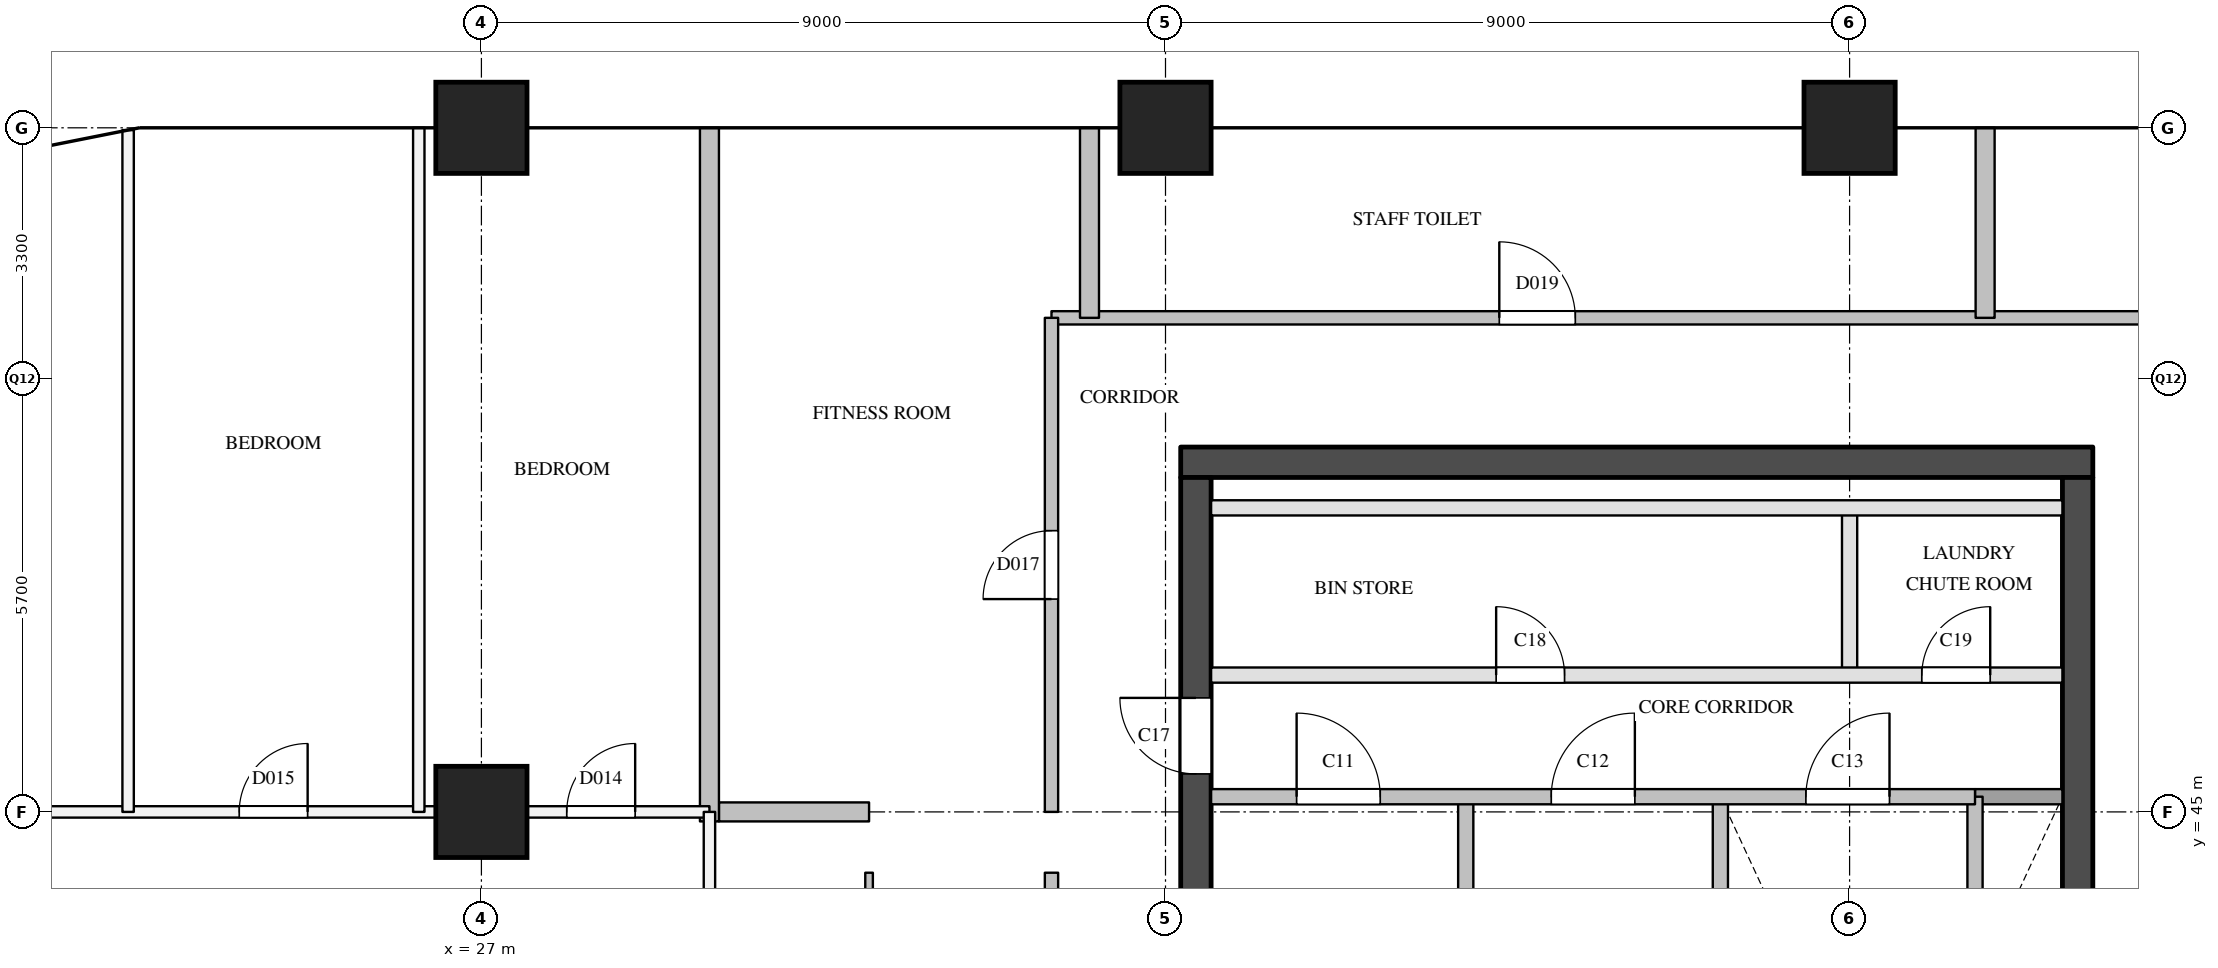
"""IFC4 building model, lengths in metres.
Left out: names, types, materials, properties, quantities, classifications, styles, units other than length and angle.
Written with IfcOpenShell. Run it as: python <this file> out.ifc"""

import sys

from ifc_helpers import new_model, si_unit, direction, frame, frame_2d, origin, origin_2d, place, context, subcontext, project, spatial, rectangle, extrude, element, fill, save


model = new_model("IFC4")
c1 = context("Model", 3, precision=1e-05, world=origin(), true_north=direction((0.0, 1.0)))
c2 = subcontext(c1, "Body", "Model", "MODEL_VIEW")
j1 = project(units=[si_unit("LENGTHUNIT", "METRE"), si_unit("PLANEANGLEUNIT", "RADIAN")], contexts=[c1])
p1 = place(None, origin())
s1 = spatial("IfcSite", under=j1, at=p1, CompositionType="ELEMENT")
p2 = place(p1, origin())
s2 = spatial("IfcBuilding", under=s1, at=p2, CompositionType="ELEMENT")
p3 = place(p2, frame((0.0, 0.0, 246.2)))
s3 = spatial("IfcBuildingStorey", under=s2, at=p3, CompositionType="ELEMENT", Elevation=246.2)
for number, where, z_axis, x_axis in (
    (1, (27.0, 45.0, 0.0), (0.0, 0.0, 1.0), (1.0, 0.0, 0.0)),
    (2, (27.0, 54.0, 0.0), (0.0, 0.0, 1.0), (1.0, 0.0, 0.0)),
    (3, (36.0, 54.0, 0.0), (0.0, 0.0, 1.0), (1.0, 0.0, 0.0)),
    (4, (45.0, 54.0, 0.0), (0.0, 0.0, 1.0), (1.0, 0.0, 0.0)),
):
    element("IfcColumn", number, at=place(p3, frame(where, z_axis=z_axis, x_axis=x_axis)), inside=s3, PredefinedType="COLUMN", context=c2, shape_type="SweptSolid", body=[
        extrude(rectangle(XDim=1.2, YDim=1.2, at=origin_2d()), origin(), (0.0, 0.0, 1.0), 3.9),
    ])
p4 = place(p3, frame((36.2, 49.6, 0.0), z_axis=(0.0, 0.0, 1.0), x_axis=(1.0, 0.0, 0.0)))
e5 = element("IfcWall", 5, at=p4, inside=s3, PredefinedType="SHEAR", context=c2, shape_type="SweptSolid", body=[
    extrude(rectangle(XDim=12.0, YDim=0.4, at=frame_2d((6.0, 0.0))), origin(), (0.0, 0.0, 1.0), 3.6),
])
p5 = place(p3, frame((36.4, 29.1, 0.0), z_axis=(0.0, 0.0, 1.0), x_axis=(0.0, 1.0, 0.0)))
e6 = element("IfcWall", 6, at=p5, inside=s3, PredefinedType="SHEAR", context=c2, shape_type="SweptSolid", body=[
    extrude(rectangle(XDim=20.3, YDim=0.4, at=frame_2d((10.15, 0.0))), origin(), (0.0, 0.0, 1.0), 3.6),
])
p6 = place(p5, frame((3.6, 0.0, 0.0)))
e7 = element("IfcOpeningElement", 7, at=p6, cuts=e6, PredefinedType="OPENING", context=c2, shape_type="SweptSolid", body=[
    extrude(rectangle(XDim=1.8, YDim=2.1, at=frame_2d((0.9, 1.05))), frame((0.0, 0.21, 0.0), z_axis=(0.0, -1.0, 0.0), x_axis=(1.0, 0.0, 0.0)), (0.0, 0.0, 1.0), 0.42),
])
p7 = place(p5, frame((16.4, 0.0, 0.0)))
e8 = element("IfcOpeningElement", 8, at=p7, cuts=e6, PredefinedType="OPENING", context=c2, shape_type="SweptSolid", body=[
    extrude(rectangle(XDim=1.0, YDim=2.1, at=frame_2d((0.5, 1.05))), frame((0.0, 0.21, 0.0), z_axis=(0.0, -1.0, 0.0), x_axis=(1.0, 0.0, 0.0)), (0.0, 0.0, 1.0), 0.42),
])
p8 = place(p3, frame((48.0, 29.1, 0.0), z_axis=(0.0, 0.0, 1.0), x_axis=(0.0, 1.0, 0.0)))
e9 = element("IfcWall", 9, at=p8, inside=s3, PredefinedType="SHEAR", context=c2, shape_type="SweptSolid", body=[
    extrude(rectangle(XDim=20.3, YDim=0.4, at=frame_2d((10.15, 0.0))), origin(), (0.0, 0.0, 1.0), 3.6),
])
p9 = place(p8, frame((12.5, 0.0, 0.0)))
e10 = element("IfcOpeningElement", 10, at=p9, cuts=e9, PredefinedType="OPENING", context=c2, shape_type="SweptSolid", body=[
    extrude(rectangle(XDim=0.7, YDim=2.1, at=frame_2d((0.35, 1.05))), frame((0.0, 0.21, 0.0), z_axis=(0.0, -1.0, 0.0), x_axis=(1.0, 0.0, 0.0)), (0.0, 0.0, 1.0), 0.42),
])
p10 = place(p8, frame((3.9, 0.0, 0.0)))
e11 = element("IfcOpeningElement", 11, at=p10, cuts=e9, PredefinedType="OPENING", context=c2, shape_type="SweptSolid", body=[
    extrude(rectangle(XDim=1.8, YDim=2.1, at=frame_2d((0.9, 1.05))), frame((0.0, 0.21, 0.0), z_axis=(0.0, -1.0, 0.0), x_axis=(1.0, 0.0, 0.0)), (0.0, 0.0, 1.0), 0.42),
])
for number, where, z_axis, x_axis in (
    (12, (39.95, 40.78, 0.0), (0.0, 0.0, 1.0), (0.0, 1.0, 0.0)),
    (13, (43.3, 40.78, 0.0), (0.0, 0.0, 1.0), (0.0, 1.0, 0.0)),
):
    element("IfcWall", number, at=place(p3, frame(where, z_axis=z_axis, x_axis=x_axis)), inside=s3, PredefinedType="SOLIDWALL", context=c2, shape_type="SweptSolid", body=[
        extrude(rectangle(XDim=4.42, YDim=0.2, at=frame_2d((2.21, 0.0))), origin(), (0.0, 0.0, 1.0), 3.6),
    ])
p11 = place(p3, frame((45.0, 46.8, 0.0), z_axis=(0.0, 0.0, 1.0), x_axis=(0.0, 1.0, 0.0)))
e14 = element("IfcWall", 14, at=p11, inside=s3, PredefinedType="PARTITIONING", context=c2, shape_type="SweptSolid", body=[
    extrude(rectangle(XDim=2.2, YDim=0.2, at=frame_2d((1.1, 0.0))), origin(), (0.0, 0.0, 1.0), 3.6),
])
p12 = place(p3, frame((46.65, 40.78, 0.0), z_axis=(0.0, 0.0, 1.0), x_axis=(0.0, 1.0, 0.0)))
e15 = element("IfcWall", 15, at=p12, inside=s3, PredefinedType="SOLIDWALL", context=c2, shape_type="SweptSolid", body=[
    extrude(rectangle(XDim=4.42, YDim=0.2, at=frame_2d((2.21, 0.0))), origin(), (0.0, 0.0, 1.0), 3.6),
])
p13 = place(p3, frame((46.65, 45.2, 0.0), z_axis=(0.0, 0.0, 1.0), x_axis=(1.0, 0.0, 0.0)))
e16 = element("IfcWall", 16, at=p13, inside=s3, PredefinedType="SOLIDWALL", context=c2, shape_type="SweptSolid", body=[
    extrude(rectangle(XDim=1.15, YDim=0.2, at=frame_2d((0.575, 0.0))), origin(), (0.0, 0.0, 1.0), 3.6),
])
p14 = place(p3, frame((36.6, 45.2, 0.0), z_axis=(0.0, 0.0, 1.0), x_axis=(1.0, 0.0, 0.0)))
e17 = element("IfcWall", 17, at=p14, inside=s3, PredefinedType="SOLIDWALL", context=c2, shape_type="SweptSolid", body=[
    extrude(rectangle(XDim=10.05, YDim=0.2, at=frame_2d((5.025, 0.0))), origin(), (0.0, 0.0, 1.0), 3.6),
])
p15 = place(p14, frame((1.125, 0.0, 0.0)))
e18 = element("IfcOpeningElement", 18, at=p15, cuts=e17, PredefinedType="OPENING", context=c2, shape_type="SweptSolid", body=[
    extrude(rectangle(XDim=1.1, YDim=2.1, at=frame_2d((0.55, 1.05))), frame((0.0, 0.11, 0.0), z_axis=(0.0, -1.0, 0.0), x_axis=(1.0, 0.0, 0.0)), (0.0, 0.0, 1.0), 0.22),
])
p16 = place(p14, frame((4.475, 0.0, 0.0)))
e19 = element("IfcOpeningElement", 19, at=p16, cuts=e17, PredefinedType="OPENING", context=c2, shape_type="SweptSolid", body=[
    extrude(rectangle(XDim=1.1, YDim=2.1, at=frame_2d((0.55, 1.05))), frame((0.0, 0.11, 0.0), z_axis=(0.0, -1.0, 0.0), x_axis=(1.0, 0.0, 0.0)), (0.0, 0.0, 1.0), 0.22),
])
p17 = place(p14, frame((7.825, 0.0, 0.0)))
e20 = element("IfcOpeningElement", 20, at=p17, cuts=e17, PredefinedType="OPENING", context=c2, shape_type="SweptSolid", body=[
    extrude(rectangle(XDim=1.1, YDim=2.1, at=frame_2d((0.55, 1.05))), frame((0.0, 0.11, 0.0), z_axis=(0.0, -1.0, 0.0), x_axis=(1.0, 0.0, 0.0)), (0.0, 0.0, 1.0), 0.22),
])
p18 = place(p3, frame((36.6, 46.8, 0.0), z_axis=(0.0, 0.0, 1.0), x_axis=(1.0, 0.0, 0.0)))
e21 = element("IfcWall", 21, at=p18, inside=s3, PredefinedType="PARTITIONING", context=c2, shape_type="SweptSolid", body=[
    extrude(rectangle(XDim=11.2, YDim=0.2, at=frame_2d((5.6, 0.0))), origin(), (0.0, 0.0, 1.0), 3.6),
])
p19 = place(p18, frame((3.75, 0.0, 0.0)))
e22 = element("IfcOpeningElement", 22, at=p19, cuts=e21, PredefinedType="OPENING", context=c2, shape_type="SweptSolid", body=[
    extrude(rectangle(XDim=0.9, YDim=2.1, at=frame_2d((0.45, 1.05))), frame((0.0, 0.11, 0.0), z_axis=(0.0, -1.0, 0.0), x_axis=(1.0, 0.0, 0.0)), (0.0, 0.0, 1.0), 0.22),
])
p20 = place(p18, frame((9.35, 0.0, 0.0)))
e23 = element("IfcOpeningElement", 23, at=p20, cuts=e21, PredefinedType="OPENING", context=c2, shape_type="SweptSolid", body=[
    extrude(rectangle(XDim=0.9, YDim=2.1, at=frame_2d((0.45, 1.05))), frame((0.0, 0.11, 0.0), z_axis=(0.0, -1.0, 0.0), x_axis=(1.0, 0.0, 0.0)), (0.0, 0.0, 1.0), 0.22),
])
p21 = place(p3, frame((36.6, 49.0, 0.0), z_axis=(0.0, 0.0, 1.0), x_axis=(1.0, 0.0, 0.0)))
e24 = element("IfcWall", 24, at=p21, inside=s3, PredefinedType="PARTITIONING", context=c2, shape_type="SweptSolid", body=[
    extrude(rectangle(XDim=11.2, YDim=0.2, at=frame_2d((5.6, 0.0))), origin(), (0.0, 0.0, 1.0), 3.6),
])
p22 = place(p3, frame((34.5, 51.5, 0.0), z_axis=(0.0, 0.0, 1.0), x_axis=(1.0, 0.0, 0.0)))
e25 = element("IfcWall", 25, at=p22, inside=s3, PredefinedType="PARTITIONING", context=c2, shape_type="SweptSolid", body=[
    extrude(rectangle(XDim=15.4, YDim=0.175, at=frame_2d((7.7, 0.0))), origin(), (0.0, 0.0, 1.0), 3.6),
])
p23 = place(p22, frame((5.892, 0.0, 0.0)))
e26 = element("IfcOpeningElement", 26, at=p23, cuts=e25, PredefinedType="OPENING", context=c2, shape_type="SweptSolid", body=[
    extrude(rectangle(XDim=1.0, YDim=2.1, at=frame_2d((0.5, 1.05))), frame((0.0, 0.097, 0.0), z_axis=(0.0, -1.0, 0.0), x_axis=(1.0, 0.0, 0.0)), (0.0, 0.0, 1.0), 0.195),
])
p24 = place(p3, frame((34.5, 28.5, 0.0), z_axis=(0.0, 0.0, 1.0), x_axis=(0.0, 1.0, 0.0)))
e27 = element("IfcWall", 27, at=p24, inside=s3, PredefinedType="PARTITIONING", context=c2, shape_type="SweptSolid", body=[
    extrude(rectangle(XDim=15.7, YDim=0.175, at=frame_2d((7.85, 0.0))), origin(), (0.0, 0.0, 1.0), 3.6),
])
p25 = place(p24, frame((10.1, 0.0, 0.0)))
e28 = element("IfcOpeningElement", 28, at=p25, cuts=e27, PredefinedType="OPENING", context=c2, shape_type="SweptSolid", body=[
    extrude(rectangle(XDim=1.0, YDim=2.1, at=frame_2d((0.5, 1.05))), frame((0.0, 0.097, 0.0), z_axis=(0.0, -1.0, 0.0), x_axis=(1.0, 0.0, 0.0)), (0.0, 0.0, 1.0), 0.195),
])
p26 = place(p24, frame((11.9, 0.0, 0.0)))
e29 = element("IfcOpeningElement", 29, at=p26, cuts=e27, PredefinedType="OPENING", context=c2, shape_type="SweptSolid", body=[
    extrude(rectangle(XDim=1.0, YDim=2.1, at=frame_2d((0.5, 1.05))), frame((0.0, 0.097, 0.0), z_axis=(0.0, -1.0, 0.0), x_axis=(1.0, 0.0, 0.0)), (0.0, 0.0, 1.0), 0.195),
])
p27 = place(p3, frame((34.5, 45.0, 0.0), z_axis=(0.0, 0.0, 1.0), x_axis=(0.0, 1.0, 0.0)))
e30 = element("IfcWall", 30, at=p27, inside=s3, PredefinedType="PARTITIONING", context=c2, shape_type="SweptSolid", body=[
    extrude(rectangle(XDim=6.5, YDim=0.175, at=frame_2d((3.25, 0.0))), origin(), (0.0, 0.0, 1.0), 3.6),
])
p28 = place(p27, frame((2.8, 0.0, 0.0)))
e31 = element("IfcOpeningElement", 31, at=p28, cuts=e30, PredefinedType="OPENING", context=c2, shape_type="SweptSolid", body=[
    extrude(rectangle(XDim=0.9, YDim=2.1, at=frame_2d((0.45, 1.05))), frame((0.0, 0.097, 0.0), z_axis=(0.0, -1.0, 0.0), x_axis=(1.0, 0.0, 0.0)), (0.0, 0.0, 1.0), 0.195),
])
p29 = place(p3, frame((18.0, 45.0, 0.0), z_axis=(0.0, 0.0, 1.0), x_axis=(1.0, 0.0, 0.0)))
e32 = element("IfcWall", 32, at=p29, inside=s3, PredefinedType="PARTITIONING", context=c2, shape_type="SweptSolid", body=[
    extrude(rectangle(XDim=12.0, YDim=0.15, at=frame_2d((6.0, 0.0))), origin(), (0.0, 0.0, 1.0), 3.6),
])
p30 = place(p29, frame((10.123, 0.0, 0.0)))
e33 = element("IfcOpeningElement", 33, at=p30, cuts=e32, PredefinedType="OPENING", context=c2, shape_type="SweptSolid", body=[
    extrude(rectangle(XDim=0.9, YDim=2.1, at=frame_2d((0.45, 1.05))), frame((0.0, 0.085, 0.0), z_axis=(0.0, -1.0, 0.0), x_axis=(1.0, 0.0, 0.0)), (0.0, 0.0, 1.0), 0.17),
])
p31 = place(p29, frame((5.814, 0.0, 0.0)))
e34 = element("IfcOpeningElement", 34, at=p31, cuts=e32, PredefinedType="OPENING", context=c2, shape_type="SweptSolid", body=[
    extrude(rectangle(XDim=0.9, YDim=2.1, at=frame_2d((0.45, 1.05))), frame((0.0, 0.085, 0.0), z_axis=(0.0, -1.0, 0.0), x_axis=(1.0, 0.0, 0.0)), (0.0, 0.0, 1.0), 0.17),
])
p32 = place(p29, frame((1.726, 0.0, 0.0)))
e35 = element("IfcOpeningElement", 35, at=p32, cuts=e32, PredefinedType="OPENING", context=c2, shape_type="SweptSolid", body=[
    extrude(rectangle(XDim=0.9, YDim=2.1, at=frame_2d((0.45, 1.05))), frame((0.0, 0.085, 0.0), z_axis=(0.0, -1.0, 0.0), x_axis=(1.0, 0.0, 0.0)), (0.0, 0.0, 1.0), 0.17),
])
p33 = place(p3, frame((22.352, 45.0, 0.0), z_axis=(0.0, 0.0, 1.0), x_axis=(0.0, 1.0, 0.0)))
e36 = element("IfcWall", 36, at=p33, inside=s3, PredefinedType="PARTITIONING", context=c2, shape_type="SweptSolid", body=[
    extrude(rectangle(XDim=8.97, YDim=0.15, at=frame_2d((4.485, 0.0))), origin(), (0.0, 0.0, 1.0), 2.6),
])
p34 = place(p3, frame((26.176, 45.0, 0.0), z_axis=(0.0, 0.0, 1.0), x_axis=(0.0, 1.0, 0.0)))
e37 = element("IfcWall", 37, at=p34, inside=s3, PredefinedType="PARTITIONING", context=c2, shape_type="SweptSolid", body=[
    extrude(rectangle(XDim=9.0, YDim=0.15, at=frame_2d((4.5, 0.0))), origin(), (0.0, 0.0, 1.0), 2.6),
])
p35 = place(p3, frame((30.0, 40.0, 0.0), z_axis=(0.0, 0.0, 1.0), x_axis=(0.0, 1.0, 0.0)))
e38 = element("IfcWall", 38, at=p35, inside=s3, PredefinedType="PARTITIONING", context=c2, shape_type="SweptSolid", body=[
    extrude(rectangle(XDim=5.0, YDim=0.15, at=frame_2d((2.5, 0.0))), origin(), (0.0, 0.0, 1.0), 3.6),
])
p36 = place(p35, frame((2.05, 0.0, 0.0)))
e39 = element("IfcOpeningElement", 39, at=p36, cuts=e38, PredefinedType="OPENING", context=c2, shape_type="SweptSolid", body=[
    extrude(rectangle(XDim=0.9, YDim=2.1, at=frame_2d((0.45, 1.05))), frame((0.0, 0.085, 0.0), z_axis=(0.0, -1.0, 0.0), x_axis=(1.0, 0.0, 0.0)), (0.0, 0.0, 1.0), 0.17),
])
p37 = place(p3, frame((30.125, 45.0, 0.0), z_axis=(0.0, 0.0, 1.0), x_axis=(1.0, 0.0, 0.0)))
e40 = element("IfcWall", 40, at=p37, inside=s3, PredefinedType="PARTITIONING", context=c2, shape_type="SweptSolid", body=[
    extrude(rectangle(XDim=1.975, YDim=0.25, at=frame_2d((0.988, 0.0))), origin(), (0.0, 0.0, 1.0), 3.6),
])
p38 = place(p3, frame((30.0, 44.875, 0.0), z_axis=(0.0, 0.0, 1.0), x_axis=(0.0, 1.0, 0.0)))
e41 = element("IfcWall", 41, at=p38, inside=s3, PredefinedType="PARTITIONING", context=c2, shape_type="SweptSolid", body=[
    extrude(rectangle(XDim=9.125, YDim=0.25, at=frame_2d((4.562, 0.0))), origin(), (0.0, 0.0, 1.0), 2.6),
])
for number, where, z_axis, x_axis in (
    (42, (35.0, 51.5, 0.0), (0.0, 0.0, 1.0), (0.0, 1.0, 0.0)),
    (43, (46.783, 51.5, 0.0), (0.0, 0.0, 1.0), (0.0, 1.0, 0.0)),
):
    element("IfcWall", number, at=place(p3, frame(where, z_axis=z_axis, x_axis=x_axis)), inside=s3, PredefinedType="PARTITIONING", context=c2, shape_type="SweptSolid", body=[
        extrude(rectangle(XDim=2.5, YDim=0.25, at=frame_2d((1.25, 0.0))), origin(), (0.0, 0.0, 1.0), 2.6),
    ])
p39 = place(p3, frame((32.1, 41.8, 0.0), z_axis=(0.0, 0.0, 1.0), x_axis=(0.0, 1.0, 0.0)))
e44 = element("IfcWall", 44, at=p39, inside=s3, PredefinedType="PARTITIONING", context=c2, shape_type="SweptSolid", body=[
    extrude(rectangle(XDim=2.4, YDim=0.1, at=frame_2d((1.2, 0.0))), origin(), (0.0, 0.0, 1.0), 3.6),
])
p40 = place(p39, frame((0.8, 0.0, 0.0)))
e45 = element("IfcOpeningElement", 45, at=p40, cuts=e44, PredefinedType="OPENING", context=c2, shape_type="SweptSolid", body=[
    extrude(rectangle(XDim=0.8, YDim=2.1, at=frame_2d((0.4, 1.05))), frame((0.0, 0.06, 0.0), z_axis=(0.0, -1.0, 0.0), x_axis=(1.0, 0.0, 0.0)), (0.0, 0.0, 1.0), 0.12),
])
p41 = place(p15, origin())
e46 = element("IfcDoor", 46, at=p41, inside=s3, OperationType="SINGLE_SWING_LEFT", PredefinedType="DOOR", context=c2, shape_type="SweptSolid", body=[
    extrude(rectangle(XDim=1.1, YDim=2.1, at=frame_2d((0.55, 1.05))), frame((0.0, 0.025, 0.0), z_axis=(0.0, -1.0, 0.0), x_axis=(1.0, 0.0, 0.0)), (0.0, 0.0, 1.0), 0.05),
])
fill(e18, e46)
p42 = place(p16, origin())
e47 = element("IfcDoor", 47, at=p42, inside=s3, OperationType="SINGLE_SWING_RIGHT", PredefinedType="DOOR", context=c2, shape_type="SweptSolid", body=[
    extrude(rectangle(XDim=1.1, YDim=2.1, at=frame_2d((0.55, 1.05))), frame((0.0, 0.025, 0.0), z_axis=(0.0, -1.0, 0.0), x_axis=(1.0, 0.0, 0.0)), (0.0, 0.0, 1.0), 0.05),
])
fill(e19, e47)
p43 = place(p17, origin())
e48 = element("IfcDoor", 48, at=p43, inside=s3, OperationType="SINGLE_SWING_RIGHT", PredefinedType="DOOR", context=c2, shape_type="SweptSolid", body=[
    extrude(rectangle(XDim=1.1, YDim=2.1, at=frame_2d((0.55, 1.05))), frame((0.0, 0.025, 0.0), z_axis=(0.0, -1.0, 0.0), x_axis=(1.0, 0.0, 0.0)), (0.0, 0.0, 1.0), 0.05),
])
fill(e20, e48)
p44 = place(p7, origin())
e49 = element("IfcDoor", 49, at=p44, inside=s3, OperationType="SINGLE_SWING_RIGHT", PredefinedType="DOOR", context=c2, shape_type="SweptSolid", body=[
    extrude(rectangle(XDim=1.0, YDim=2.1, at=frame_2d((0.5, 1.05))), frame((0.0, 0.025, 0.0), z_axis=(0.0, -1.0, 0.0), x_axis=(1.0, 0.0, 0.0)), (0.0, 0.0, 1.0), 0.05),
])
fill(e8, e49)
p45 = place(p19, origin())
e50 = element("IfcDoor", 50, at=p45, inside=s3, OperationType="SINGLE_SWING_LEFT", PredefinedType="DOOR", context=c2, shape_type="SweptSolid", body=[
    extrude(rectangle(XDim=0.9, YDim=2.1, at=frame_2d((0.45, 1.05))), frame((0.0, 0.025, 0.0), z_axis=(0.0, -1.0, 0.0), x_axis=(1.0, 0.0, 0.0)), (0.0, 0.0, 1.0), 0.05),
])
fill(e22, e50)
p46 = place(p20, origin())
e51 = element("IfcDoor", 51, at=p46, inside=s3, OperationType="SINGLE_SWING_RIGHT", PredefinedType="DOOR", context=c2, shape_type="SweptSolid", body=[
    extrude(rectangle(XDim=0.9, YDim=2.1, at=frame_2d((0.45, 1.05))), frame((0.0, 0.025, 0.0), z_axis=(0.0, -1.0, 0.0), x_axis=(1.0, 0.0, 0.0)), (0.0, 0.0, 1.0), 0.05),
])
fill(e23, e51)
p47 = place(p30, origin())
e52 = element("IfcDoor", 52, at=p47, inside=s3, OperationType="SINGLE_SWING_RIGHT", PredefinedType="DOOR", context=c2, shape_type="SweptSolid", body=[
    extrude(rectangle(XDim=0.9, YDim=2.1, at=frame_2d((0.45, 1.05))), frame((0.0, 0.025, 0.0), z_axis=(0.0, -1.0, 0.0), x_axis=(1.0, 0.0, 0.0)), (0.0, 0.0, 1.0), 0.05),
])
fill(e33, e52)
p48 = place(p31, origin())
e53 = element("IfcDoor", 53, at=p48, inside=s3, OperationType="SINGLE_SWING_RIGHT", PredefinedType="DOOR", context=c2, shape_type="SweptSolid", body=[
    extrude(rectangle(XDim=0.9, YDim=2.1, at=frame_2d((0.45, 1.05))), frame((0.0, 0.025, 0.0), z_axis=(0.0, -1.0, 0.0), x_axis=(1.0, 0.0, 0.0)), (0.0, 0.0, 1.0), 0.05),
])
fill(e34, e53)
p49 = place(p28, origin())
e54 = element("IfcDoor", 54, at=p49, inside=s3, OperationType="SINGLE_SWING_LEFT", PredefinedType="DOOR", context=c2, shape_type="SweptSolid", body=[
    extrude(rectangle(XDim=0.9, YDim=2.1, at=frame_2d((0.45, 1.05))), frame((0.0, 0.025, 0.0), z_axis=(0.0, -1.0, 0.0), x_axis=(1.0, 0.0, 0.0)), (0.0, 0.0, 1.0), 0.05),
])
fill(e31, e54)
p50 = place(p23, origin())
e55 = element("IfcDoor", 55, at=p50, inside=s3, OperationType="SINGLE_SWING_LEFT", PredefinedType="DOOR", context=c2, shape_type="SweptSolid", body=[
    extrude(rectangle(XDim=1.0, YDim=2.1, at=frame_2d((0.5, 1.05))), frame((0.0, 0.025, 0.0), z_axis=(0.0, -1.0, 0.0), x_axis=(1.0, 0.0, 0.0)), (0.0, 0.0, 1.0), 0.05),
])
fill(e26, e55)
save(model, sys.argv[1])
